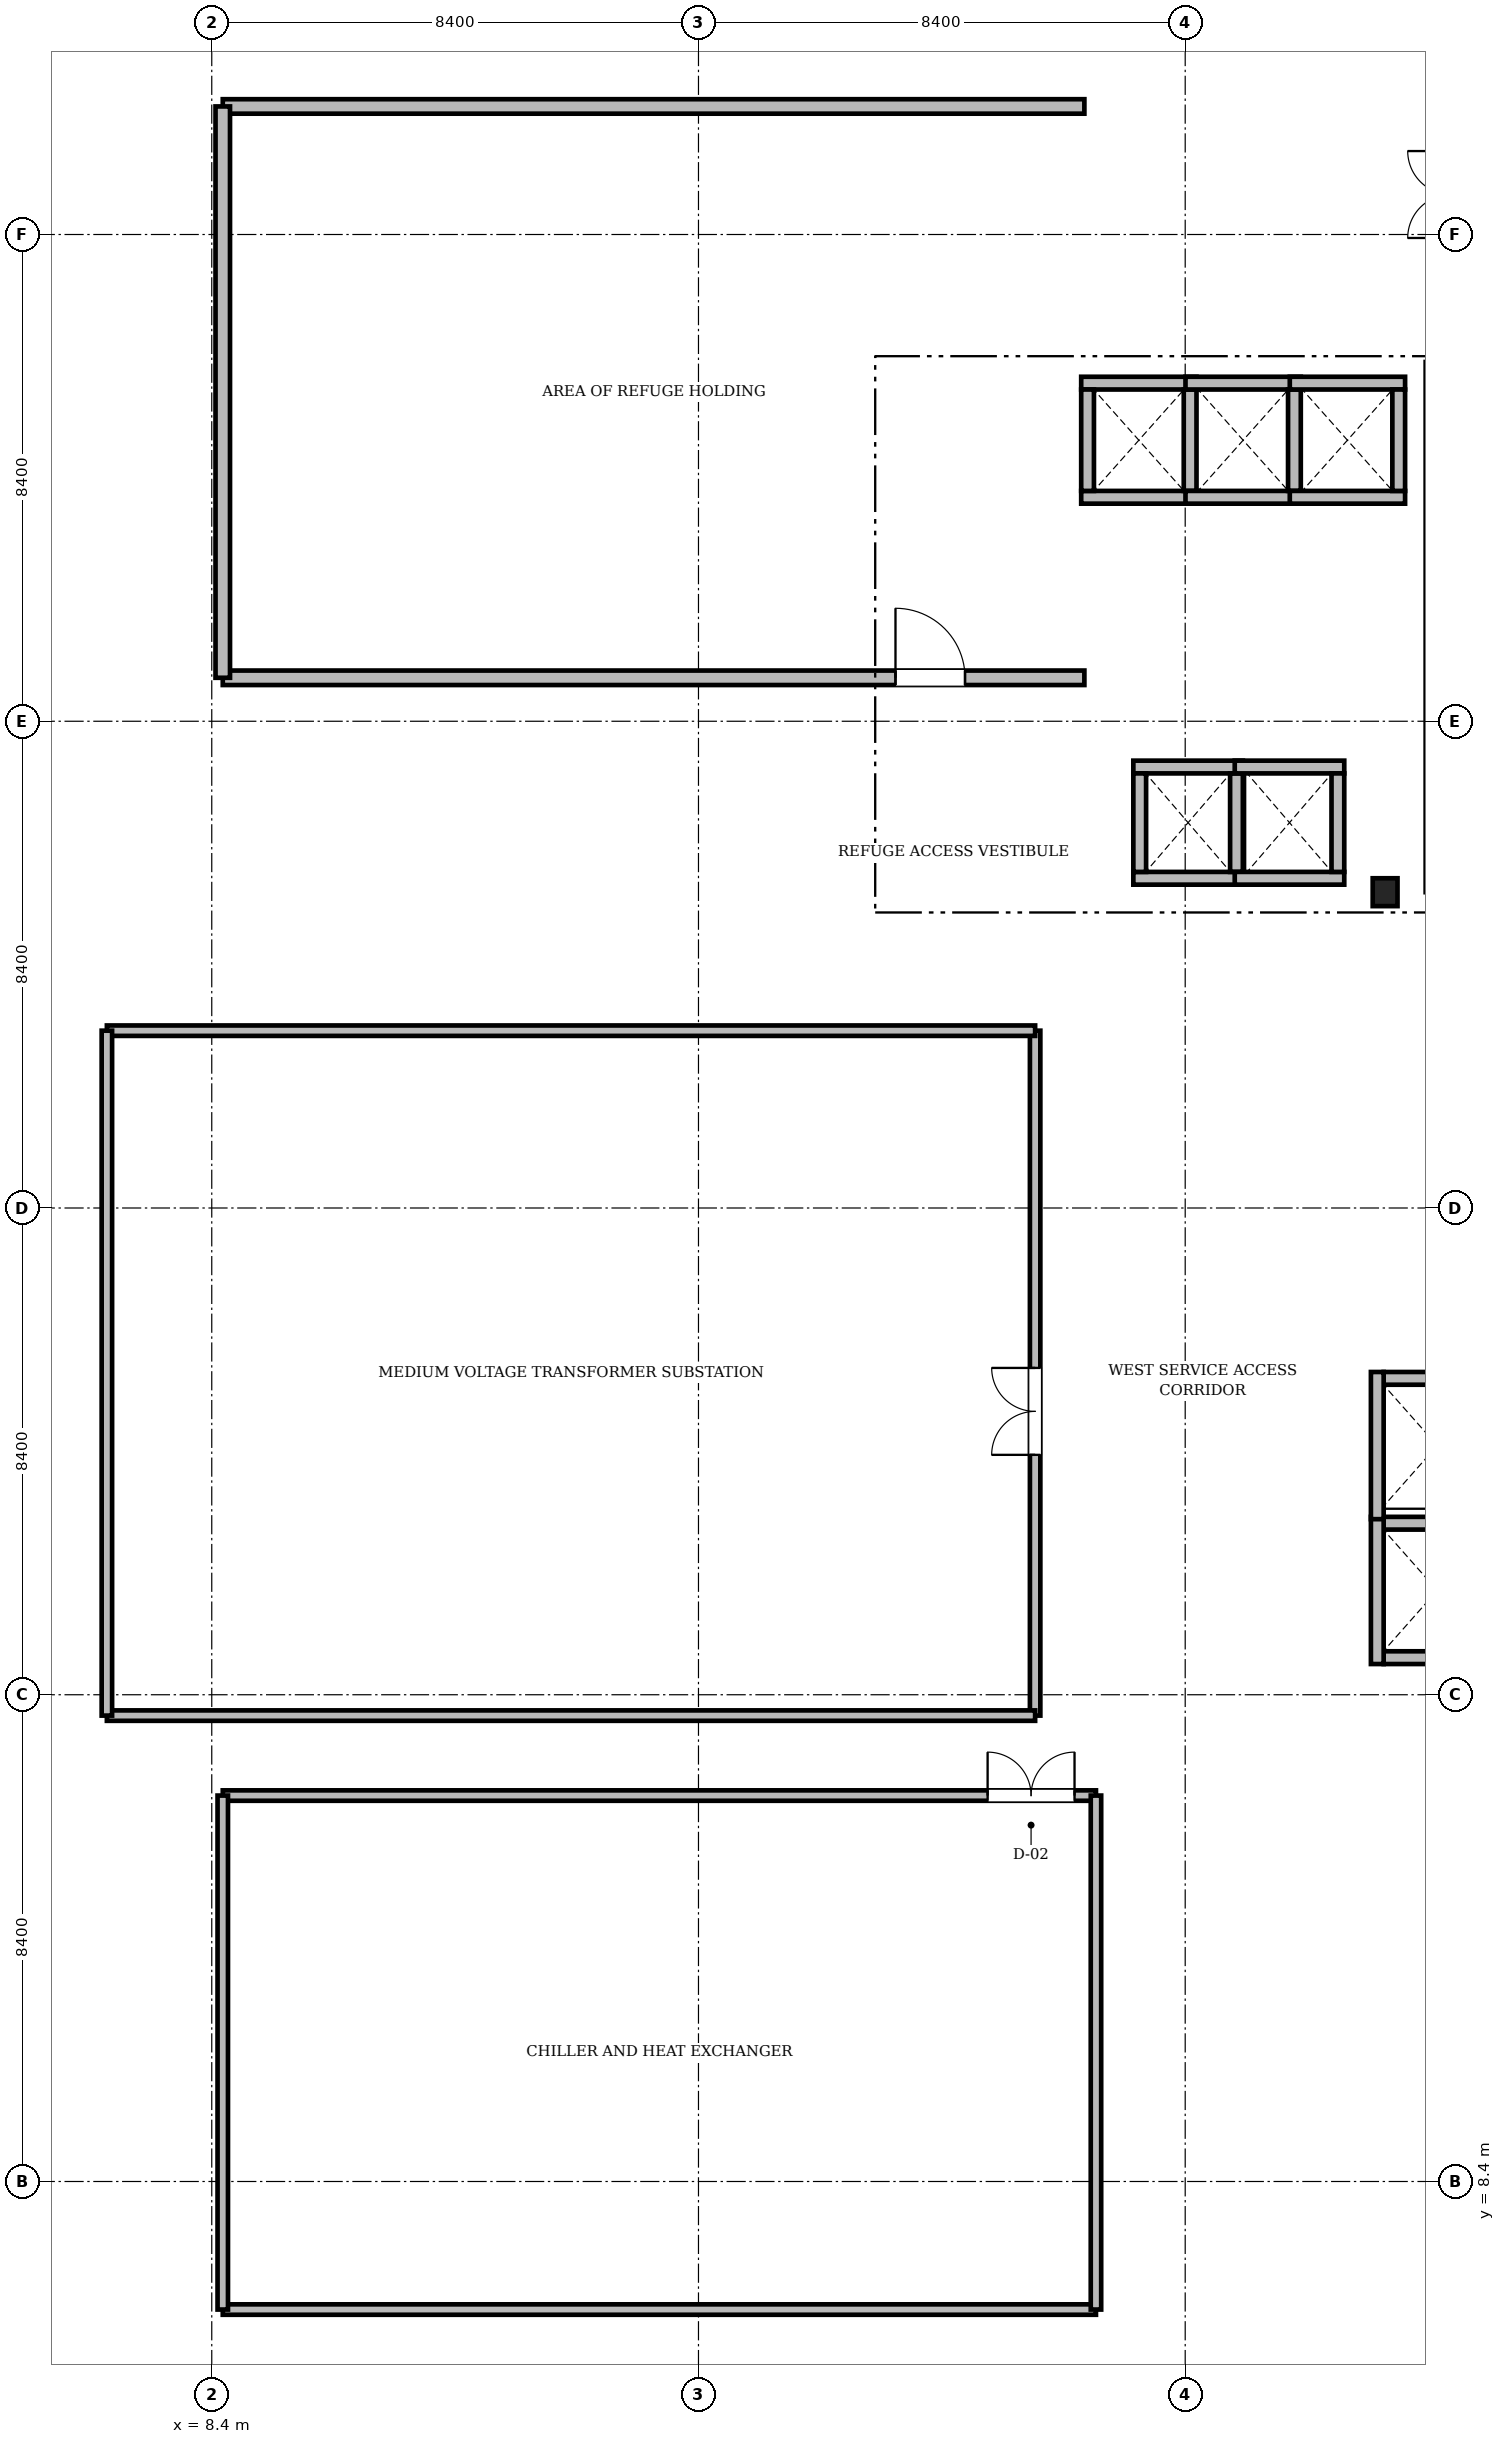
"""IFC4 building model, lengths in metres.
Left out: names, types, materials, properties, quantities, classifications, styles, units other than length and angle.
Written with IfcOpenShell. Run it as: python <this file> out.ifc"""

import sys

from ifc_helpers import new_model, si_unit, direction, frame, frame_2d, origin, origin_2d, place, context, subcontext, project, spatial, rectangle, i_section, extrude, source, transform, mapped, element, fill, save


model = new_model("IFC4")
c1 = context("Model", 3, precision=1e-05, world=origin(), true_north=direction((0.0, 1.0)))
c2 = subcontext(c1, "Body", "Model", "MODEL_VIEW")
j1 = project(units=[si_unit("LENGTHUNIT", "METRE"), si_unit("PLANEANGLEUNIT", "RADIAN")], contexts=[c1])
p1 = place(None, origin())
s1 = spatial("IfcSite", under=j1, at=p1, CompositionType="ELEMENT")
p2 = place(p1, origin())
s2 = spatial("IfcBuilding", under=s1, at=p2, CompositionType="ELEMENT")
p3 = place(p2, frame((0.0, 0.0, 93.3)))
s3 = spatial("IfcBuildingStorey", under=s2, at=p3, CompositionType="ELEMENT", Elevation=93.3)
m1 = source(origin(), c2, "Body", "SweptSolid", [
    extrude(i_section(OverallWidth=0.428, OverallDepth=0.481, WebThickness=0.04, FlangeThickness=0.063, FilletRadius=0.015, at=origin_2d()), origin(), (0.0, 0.0, 1.0), 4.75),
])
p4 = place(p3, frame((28.65, 30.65, 0.0), z_axis=(0.0, 0.0, 1.0), x_axis=(1.0, 0.0, 0.0)))
e1 = element("IfcColumn", 1, at=p4, inside=s3, PredefinedType="COLUMN", context=c2, shape_type="MappedRepresentation", body=[
    mapped(m1, transform((0.0, 0.0, 0.0), scale=1.0)),
])
m2 = source(origin(), c2, "Body", "SweptSolid", [
    extrude(rectangle(XDim=1.8, YDim=1.8, at=origin_2d()), origin(), (0.0, 0.0, 1.0), 6.543),
])
for number, where, z_axis, x_axis in (
    (2, (3.25, 36.54, 0.0), (0.688, 0.0, 0.726), (0.0, 1.0, 0.0)),
    (3, (3.25, 13.86, 0.0), (0.688, 0.0, 0.726), (0.0, 1.0, 0.0)),
):
    element("IfcColumn", number, at=place(p3, frame(where, z_axis=z_axis, x_axis=x_axis)), inside=s3, PredefinedType="COLUMN", context=c2, shape_type="MappedRepresentation", body=[
        mapped(m2, transform((0.0, 0.0, 0.0), scale=1.0)),
    ])
m3 = source(origin(), c2, "Body", "SweptSolid", [
    extrude(i_section(OverallWidth=0.419, OverallDepth=0.449, WebThickness=0.031, FlangeThickness=0.048, FilletRadius=0.015, at=origin_2d()), origin(), (0.0, 0.0, 1.0), 6.543),
])
for number, where, z_axis, x_axis in (
    (4, (3.25, 43.45, 0.0), (0.688, 0.0, 0.726), (0.0, 1.0, 0.0)),
    (5, (3.25, 28.9, 0.0), (0.688, 0.0, 0.726), (0.0, 1.0, 0.0)),
    (6, (3.25, 21.5, 0.0), (0.688, 0.0, 0.726), (0.0, 1.0, 0.0)),
    (7, (3.25, 6.95, 0.0), (0.688, 0.0, 0.726), (0.0, 1.0, 0.0)),
):
    element("IfcColumn", number, at=place(p3, frame(where, z_axis=z_axis, x_axis=x_axis)), inside=s3, PredefinedType="COLUMN", context=c2, shape_type="MappedRepresentation", body=[
        mapped(m3, transform((0.0, 0.0, 0.0), scale=1.0)),
    ])
m4 = source(origin(), c2, "Body", "SweptSolid", [
    extrude(rectangle(XDim=1.99, YDim=0.22, at=frame_2d((0.995, 0.0))), origin(), (0.0, 0.0, 1.0), 4.75),
])
for number, where, z_axis, x_axis in (
    (8, (23.405, 37.465, 0.0), (0.0, 0.0, 1.0), (1.0, 0.0, 0.0)),
    (9, (23.405, 39.435, 0.0), (0.0, 0.0, 1.0), (1.0, 0.0, 0.0)),
):
    element("IfcWall", number, at=place(p3, frame(where, z_axis=z_axis, x_axis=x_axis)), inside=s3, PredefinedType="SOLIDWALL", context=c2, shape_type="MappedRepresentation", body=[
        mapped(m4, transform((0.0, 0.0, 0.0), scale=1.0)),
    ])
m5 = source(origin(), c2, "Body", "SweptSolid", [
    extrude(rectangle(XDim=1.75, YDim=0.22, at=frame_2d((0.875, 0.0))), origin(), (0.0, 0.0, 1.0), 4.75),
])
for number, where, z_axis, x_axis in (
    (10, (23.515, 37.575, 0.0), (0.0, 0.0, 1.0), (0.0, 1.0, 0.0)),
    (11, (25.285, 37.575, 0.0), (0.0, 0.0, 1.0), (0.0, 1.0, 0.0)),
):
    element("IfcWall", number, at=place(p3, frame(where, z_axis=z_axis, x_axis=x_axis)), inside=s3, PredefinedType="SOLIDWALL", context=c2, shape_type="MappedRepresentation", body=[
        mapped(m5, transform((0.0, 0.0, 0.0), scale=1.0)),
    ])
for number, where, z_axis, x_axis in (
    (12, (25.205, 37.465, 0.0), (0.0, 0.0, 1.0), (1.0, 0.0, 0.0)),
    (13, (25.205, 39.435, 0.0), (0.0, 0.0, 1.0), (1.0, 0.0, 0.0)),
):
    element("IfcWall", number, at=place(p3, frame(where, z_axis=z_axis, x_axis=x_axis)), inside=s3, PredefinedType="SOLIDWALL", context=c2, shape_type="MappedRepresentation", body=[
        mapped(m4, transform((0.0, 0.0, 0.0), scale=1.0)),
    ])
p5 = place(p3, frame((27.085, 37.575, 0.0), z_axis=(0.0, 0.0, 1.0), x_axis=(0.0, 1.0, 0.0)))
e14 = element("IfcWall", 14, at=p5, inside=s3, PredefinedType="SOLIDWALL", context=c2, shape_type="MappedRepresentation", body=[
    mapped(m5, transform((0.0, 0.0, 0.0), scale=1.0)),
])
m6 = source(origin(), c2, "Body", "SweptSolid", [
    extrude(rectangle(XDim=1.99, YDim=0.22, at=frame_2d((0.995, 0.0))), origin(), (0.0, 0.0, 1.0), 4.75),
])
for number, where, z_axis, x_axis in (
    (15, (27.005, 37.465, 0.0), (0.0, 0.0, 1.0), (1.0, 0.0, 0.0)),
    (16, (27.005, 39.435, 0.0), (0.0, 0.0, 1.0), (1.0, 0.0, 0.0)),
):
    element("IfcWall", number, at=place(p3, frame(where, z_axis=z_axis, x_axis=x_axis)), inside=s3, PredefinedType="SOLIDWALL", context=c2, shape_type="MappedRepresentation", body=[
        mapped(m6, transform((0.0, 0.0, 0.0), scale=1.0)),
    ])
p6 = place(p3, frame((28.885, 37.575, 0.0), z_axis=(0.0, 0.0, 1.0), x_axis=(0.0, 1.0, 0.0)))
e17 = element("IfcWall", 17, at=p6, inside=s3, PredefinedType="SOLIDWALL", context=c2, shape_type="MappedRepresentation", body=[
    mapped(m5, transform((0.0, 0.0, 0.0), scale=1.0)),
])
m7 = source(origin(), c2, "Body", "SweptSolid", [
    extrude(rectangle(XDim=1.89, YDim=0.22, at=frame_2d((0.945, 0.0))), origin(), (0.0, 0.0, 1.0), 4.75),
])
for number, where, z_axis, x_axis in (
    (18, (24.305, 30.89, 0.0), (0.0, 0.0, 1.0), (1.0, 0.0, 0.0)),
    (19, (24.305, 32.81, 0.0), (0.0, 0.0, 1.0), (1.0, 0.0, 0.0)),
):
    element("IfcWall", number, at=place(p3, frame(where, z_axis=z_axis, x_axis=x_axis)), inside=s3, PredefinedType="SOLIDWALL", context=c2, shape_type="MappedRepresentation", body=[
        mapped(m7, transform((0.0, 0.0, 0.0), scale=1.0)),
    ])
m8 = source(origin(), c2, "Body", "SweptSolid", [
    extrude(rectangle(XDim=1.7, YDim=0.22, at=frame_2d((0.85, 0.0))), origin(), (0.0, 0.0, 1.0), 4.75),
])
for number, where, z_axis, x_axis in (
    (20, (24.415, 31.0, 0.0), (0.0, 0.0, 1.0), (0.0, 1.0, 0.0)),
    (21, (26.085, 31.0, 0.0), (0.0, 0.0, 1.0), (0.0, 1.0, 0.0)),
):
    element("IfcWall", number, at=place(p3, frame(where, z_axis=z_axis, x_axis=x_axis)), inside=s3, PredefinedType="SOLIDWALL", context=c2, shape_type="MappedRepresentation", body=[
        mapped(m8, transform((0.0, 0.0, 0.0), scale=1.0)),
    ])
for number, where, z_axis, x_axis in (
    (22, (26.055, 30.89, 0.0), (0.0, 0.0, 1.0), (1.0, 0.0, 0.0)),
    (23, (26.055, 32.81, 0.0), (0.0, 0.0, 1.0), (1.0, 0.0, 0.0)),
):
    element("IfcWall", number, at=place(p3, frame(where, z_axis=z_axis, x_axis=x_axis)), inside=s3, PredefinedType="SOLIDWALL", context=c2, shape_type="MappedRepresentation", body=[
        mapped(m7, transform((0.0, 0.0, 0.0), scale=1.0)),
    ])
p7 = place(p3, frame((27.835, 31.0, 0.0), z_axis=(0.0, 0.0, 1.0), x_axis=(0.0, 1.0, 0.0)))
e24 = element("IfcWall", 24, at=p7, inside=s3, PredefinedType="SOLIDWALL", context=c2, shape_type="MappedRepresentation", body=[
    mapped(m8, transform((0.0, 0.0, 0.0), scale=1.0)),
])
m9 = source(origin(), c2, "Body", "SweptSolid", [
    extrude(rectangle(XDim=1.85, YDim=0.22, at=frame_2d((0.925, 0.0))), origin(), (0.0, 0.0, 1.0), 4.75),
])
for number, where, z_axis, x_axis in (
    (25, (28.625, 17.44, 0.0), (0.0, 0.0, 1.0), (1.0, 0.0, 0.0)),
    (26, (28.625, 19.76, 0.0), (0.0, 0.0, 1.0), (1.0, 0.0, 0.0)),
):
    element("IfcWall", number, at=place(p3, frame(where, z_axis=z_axis, x_axis=x_axis)), inside=s3, PredefinedType="SOLIDWALL", context=c2, shape_type="MappedRepresentation", body=[
        mapped(m9, transform((0.0, 0.0, 0.0), scale=1.0)),
    ])
m10 = source(origin(), c2, "Body", "SweptSolid", [
    extrude(rectangle(XDim=2.54, YDim=0.22, at=frame_2d((1.27, 0.0))), origin(), (0.0, 0.0, 1.0), 4.75),
])
p8 = place(p3, frame((28.515, 17.33, 0.0), z_axis=(0.0, 0.0, 1.0), x_axis=(0.0, 1.0, 0.0)))
e27 = element("IfcWall", 27, at=p8, inside=s3, PredefinedType="SOLIDWALL", context=c2, shape_type="MappedRepresentation", body=[
    mapped(m10, transform((0.0, 0.0, 0.0), scale=1.0)),
])
p9 = place(p3, frame((28.625, 22.26, 0.0), z_axis=(0.0, 0.0, 1.0), x_axis=(1.0, 0.0, 0.0)))
e28 = element("IfcWall", 28, at=p9, inside=s3, PredefinedType="SOLIDWALL", context=c2, shape_type="MappedRepresentation", body=[
    mapped(m9, transform((0.0, 0.0, 0.0), scale=1.0)),
])
p10 = place(p3, frame((28.515, 19.83, 0.0), z_axis=(0.0, 0.0, 1.0), x_axis=(0.0, 1.0, 0.0)))
e29 = element("IfcWall", 29, at=p10, inside=s3, PredefinedType="SOLIDWALL", context=c2, shape_type="MappedRepresentation", body=[
    mapped(m10, transform((0.0, 0.0, 0.0), scale=1.0)),
])
m11 = source(origin(), c2, "Body", "SweptSolid", [
    extrude(rectangle(XDim=15.07, YDim=0.18, at=frame_2d((7.535, 0.0))), origin(), (0.0, 0.0, 1.0), 3.928),
])
p11 = place(p3, frame((8.59, 15.06, 0.0), z_axis=(0.0, 0.0, 1.0), x_axis=(1.0, 0.0, 0.0)))
e30 = element("IfcWall", 30, at=p11, inside=s3, PredefinedType="PARTITIONING", context=c2, shape_type="MappedRepresentation", body=[
    mapped(m11, transform((0.0, 0.0, 0.0), scale=1.0)),
])
m12 = source(origin(), c2, "Body", "SweptSolid", [
    extrude(rectangle(XDim=1.5, YDim=2.3, at=frame_2d((0.75, 1.15))), frame((0.0, 0.1, 0.0), z_axis=(0.0, -1.0, 0.0), x_axis=(1.0, 0.0, 0.0)), (0.0, 0.0, 1.0), 0.2),
])
p12 = place(p11, frame((13.2, 0.0, 0.0)))
e31 = element("IfcOpeningElement", 31, at=p12, cuts=e30, PredefinedType="OPENING", context=c2, shape_type="MappedRepresentation", body=[
    mapped(m12, transform((0.0, 0.0, 0.0), scale=1.0)),
])
m13 = source(origin(), c2, "Body", "SweptSolid", [
    extrude(rectangle(XDim=14.87, YDim=0.25, at=frame_2d((7.435, 0.0))), origin(), (0.0, 0.0, 1.0), 4.75),
])
p13 = place(p3, frame((8.59, 34.35, 0.0), z_axis=(0.0, 0.0, 1.0), x_axis=(1.0, 0.0, 0.0)))
e32 = element("IfcWall", 32, at=p13, inside=s3, PredefinedType="SOLIDWALL", context=c2, shape_type="MappedRepresentation", body=[
    mapped(m13, transform((0.0, 0.0, 0.0), scale=1.0)),
])
m14 = source(origin(), c2, "Body", "SweptSolid", [
    extrude(rectangle(XDim=1.2, YDim=2.2, at=frame_2d((0.6, 1.1))), frame((0.0, 0.135, 0.0), z_axis=(0.0, -1.0, 0.0), x_axis=(1.0, 0.0, 0.0)), (0.0, 0.0, 1.0), 0.27),
])
p14 = place(p13, frame((11.61, 0.0, 0.0)))
e33 = element("IfcOpeningElement", 33, at=p14, cuts=e32, PredefinedType="OPENING", context=c2, shape_type="MappedRepresentation", body=[
    mapped(m14, transform((0.0, 0.0, 0.0), scale=1.0)),
])
m15 = source(origin(), c2, "Body", "SweptSolid", [
    extrude(rectangle(XDim=11.82, YDim=0.18, at=frame_2d((5.91, 0.0))), origin(), (0.0, 0.0, 1.0), 3.928),
])
p15 = place(p3, frame((22.61, 16.44, 0.0), z_axis=(0.0, 0.0, 1.0), x_axis=(0.0, 1.0, 0.0)))
e34 = element("IfcWall", 34, at=p15, inside=s3, PredefinedType="PARTITIONING", context=c2, shape_type="MappedRepresentation", body=[
    mapped(m15, transform((0.0, 0.0, 0.0), scale=1.0)),
])
p16 = place(p15, frame((4.5, 0.0, 0.0)))
e35 = element("IfcOpeningElement", 35, at=p16, cuts=e34, PredefinedType="OPENING", context=c2, shape_type="MappedRepresentation", body=[
    mapped(m12, transform((0.0, 0.0, 0.0), scale=1.0)),
])
m16 = source(origin(), c2, "Body", "SweptSolid", [
    extrude(rectangle(XDim=16.02, YDim=0.18, at=frame_2d((8.01, 0.0))), origin(), (0.0, 0.0, 1.0), 4.026),
])
p17 = place(p3, frame((6.59, 16.44, 0.0), z_axis=(0.0, 0.0, 1.0), x_axis=(1.0, 0.0, 0.0)))
e36 = element("IfcWall", 36, at=p17, inside=s3, PredefinedType="PARTITIONING", context=c2, shape_type="MappedRepresentation", body=[
    mapped(m16, transform((0.0, 0.0, 0.0), scale=1.0)),
])
m17 = source(origin(), c2, "Body", "SweptSolid", [
    extrude(rectangle(XDim=16.02, YDim=0.18, at=frame_2d((8.01, 0.0))), origin(), (0.0, 0.0, 1.0), 3.928),
])
p18 = place(p3, frame((6.59, 28.26, 0.0), z_axis=(0.0, 0.0, 1.0), x_axis=(1.0, 0.0, 0.0)))
e37 = element("IfcWall", 37, at=p18, inside=s3, PredefinedType="PARTITIONING", context=c2, shape_type="MappedRepresentation", body=[
    mapped(m17, transform((0.0, 0.0, 0.0), scale=1.0)),
])
p19 = place(p3, frame((8.59, 6.19, 0.0), z_axis=(0.0, 0.0, 1.0), x_axis=(1.0, 0.0, 0.0)))
e38 = element("IfcWall", 38, at=p19, inside=s3, PredefinedType="PARTITIONING", context=c2, shape_type="MappedRepresentation", body=[
    mapped(m11, transform((0.0, 0.0, 0.0), scale=1.0)),
])
m18 = source(origin(), c2, "Body", "SweptSolid", [
    extrude(rectangle(XDim=14.87, YDim=0.25, at=frame_2d((7.435, 0.0))), origin(), (0.0, 0.0, 1.0), 4.026),
])
p20 = place(p3, frame((8.59, 44.21, 0.0), z_axis=(0.0, 0.0, 1.0), x_axis=(1.0, 0.0, 0.0)))
e39 = element("IfcWall", 39, at=p20, inside=s3, PredefinedType="SOLIDWALL", context=c2, shape_type="MappedRepresentation", body=[
    mapped(m18, transform((0.0, 0.0, 0.0), scale=1.0)),
])
m19 = source(origin(), c2, "Body", "SweptSolid", [
    extrude(rectangle(XDim=11.82, YDim=0.18, at=frame_2d((5.91, 0.0))), origin(), (0.0, 0.0, 1.0), 4.75),
])
p21 = place(p3, frame((6.59, 16.44, 0.0), z_axis=(0.0, 0.0, 1.0), x_axis=(0.0, 1.0, 0.0)))
e40 = element("IfcWall", 40, at=p21, inside=s3, PredefinedType="PARTITIONING", context=c2, shape_type="MappedRepresentation", body=[
    mapped(m19, transform((0.0, 0.0, 0.0), scale=1.0)),
])
m20 = source(origin(), c2, "Body", "SweptSolid", [
    extrude(rectangle(XDim=9.86, YDim=0.25, at=frame_2d((4.93, 0.0))), origin(), (0.0, 0.0, 1.0), 4.026),
])
p22 = place(p3, frame((8.59, 34.35, 0.0), z_axis=(0.0, 0.0, 1.0), x_axis=(0.0, 1.0, 0.0)))
e41 = element("IfcWall", 41, at=p22, inside=s3, PredefinedType="SOLIDWALL", context=c2, shape_type="MappedRepresentation", body=[
    mapped(m20, transform((0.0, 0.0, 0.0), scale=1.0)),
])
m21 = source(origin(), c2, "Body", "SweptSolid", [
    extrude(rectangle(XDim=8.87, YDim=0.18, at=frame_2d((4.435, 0.0))), origin(), (0.0, 0.0, 1.0), 3.928),
])
for number, where, z_axis, x_axis in (
    (42, (8.59, 6.19, 0.0), (0.0, 0.0, 1.0), (0.0, 1.0, 0.0)),
    (43, (23.66, 6.19, 0.0), (0.0, 0.0, 1.0), (0.0, 1.0, 0.0)),
):
    element("IfcWall", number, at=place(p3, frame(where, z_axis=z_axis, x_axis=x_axis)), inside=s3, PredefinedType="PARTITIONING", context=c2, shape_type="MappedRepresentation", body=[
        mapped(m21, transform((0.0, 0.0, 0.0), scale=1.0)),
    ])
m22 = source(origin(), c2, "Body", "SweptSolid", [
    extrude(rectangle(XDim=1.5, YDim=2.3, at=frame_2d((0.75, 1.15))), frame((0.0, 0.025, 0.0), z_axis=(0.0, -1.0, 0.0), x_axis=(1.0, 0.0, 0.0)), (0.0, 0.0, 1.0), 0.05),
])
p23 = place(p12, origin())
e44 = element("IfcDoor", 44, at=p23, inside=s3, OperationType="DOUBLE_DOOR_SINGLE_SWING", PredefinedType="DOOR", context=c2, shape_type="MappedRepresentation", body=[
    mapped(m22, transform((0.0, 0.0, 0.0), scale=1.0)),
])
fill(e31, e44)
m23 = source(origin(), c2, "Body", "SweptSolid", [
    extrude(rectangle(XDim=1.2, YDim=2.2, at=frame_2d((0.6, 1.1))), frame((0.0, 0.025, 0.0), z_axis=(0.0, -1.0, 0.0), x_axis=(1.0, 0.0, 0.0)), (0.0, 0.0, 1.0), 0.05),
])
p24 = place(p14, origin())
e45 = element("IfcDoor", 45, at=p24, inside=s3, OperationType="SINGLE_SWING_LEFT", PredefinedType="DOOR", context=c2, shape_type="MappedRepresentation", body=[
    mapped(m23, transform((0.0, 0.0, 0.0), scale=1.0)),
])
fill(e33, e45)
p25 = place(p16, origin())
e46 = element("IfcDoor", 46, at=p25, inside=s3, OperationType="DOUBLE_DOOR_SINGLE_SWING", PredefinedType="DOOR", context=c2, shape_type="MappedRepresentation", body=[
    mapped(m22, transform((0.0, 0.0, 0.0), scale=1.0)),
])
fill(e35, e46)
save(model, sys.argv[1])
